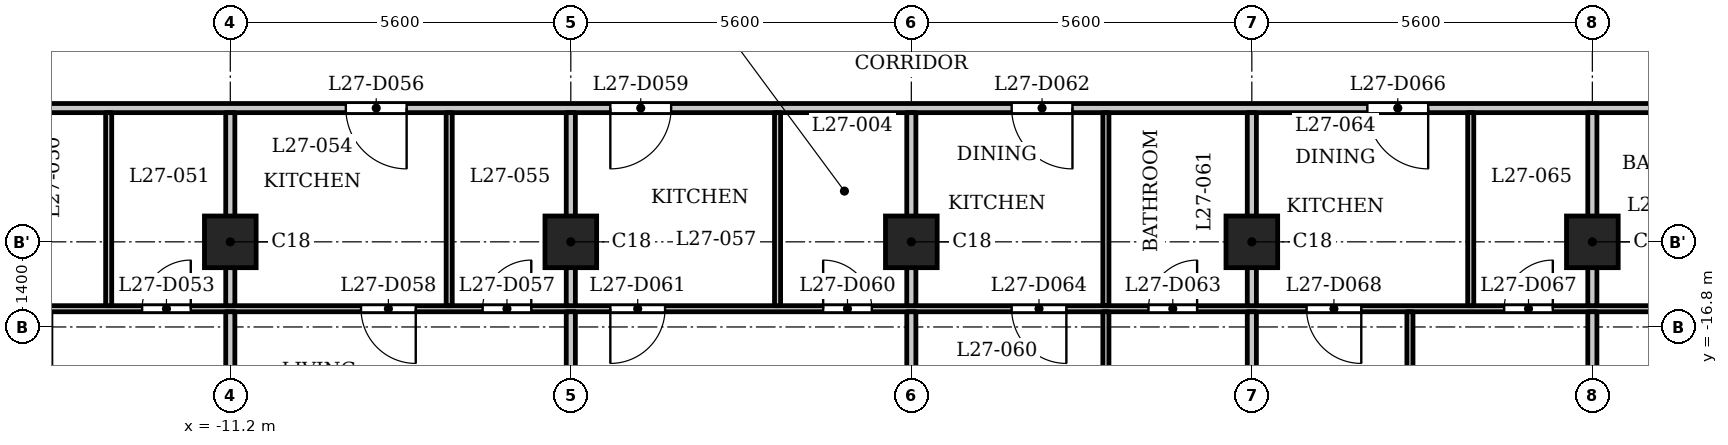
"""IFC4 building model, lengths in metres.
Left out: names, types, materials, properties, quantities, classifications, styles, units other than length and angle.
Written with IfcOpenShell. Run it as: python <this file> out.ifc"""

import sys

from ifc_helpers import new_model, si_unit, direction, frame, frame_2d, origin, origin_2d, place, context, subcontext, project, spatial, rectangle, extrude, element, fill, save


model = new_model("IFC4")
c1 = context("Model", 3, precision=1e-05, world=origin(), true_north=direction((0.0, 1.0)))
c2 = subcontext(c1, "Body", "Model", "MODEL_VIEW")
j1 = project(units=[si_unit("LENGTHUNIT", "METRE"), si_unit("PLANEANGLEUNIT", "RADIAN")], contexts=[c1])
p1 = place(None, origin())
s1 = spatial("IfcSite", under=j1, at=p1, CompositionType="ELEMENT")
p2 = place(p1, origin())
s2 = spatial("IfcBuilding", under=s1, at=p2, CompositionType="ELEMENT")
p3 = place(p2, frame((0.0, 0.0, 107.8)))
s3 = spatial("IfcBuildingStorey", under=s2, at=p3, CompositionType="ELEMENT", Elevation=107.8)
for number, where, z_axis, x_axis in (
    (1, (-11.2, -15.4, 0.0), (0.0, 0.0, 1.0), (1.0, 0.0, 0.0)),
    (2, (-5.6, -15.4, 0.0), (0.0, 0.0, 1.0), (1.0, 0.0, 0.0)),
    (3, (0.0, -15.4, 0.0), (0.0, 0.0, 1.0), (1.0, 0.0, 0.0)),
    (4, (5.6, -15.4, 0.0), (0.0, 0.0, 1.0), (1.0, 0.0, 0.0)),
    (5, (11.2, -15.4, 0.0), (0.0, 0.0, 1.0), (1.0, 0.0, 0.0)),
):
    element("IfcColumn", number, at=place(p3, frame(where, z_axis=z_axis, x_axis=x_axis)), inside=s3, PredefinedType="COLUMN", context=c2, shape_type="SweptSolid", body=[
        extrude(rectangle(XDim=0.85, YDim=0.85, at=origin_2d()), origin(), (0.0, 0.0, 1.0), 3.5),
    ])
p4 = place(p3, frame((-16.725, -16.5, 0.0), z_axis=(0.0, 0.0, 1.0), x_axis=(1.0, 0.0, 0.0)))
e6 = element("IfcWall", 6, at=p4, inside=s3, PredefinedType="PARTITIONING", context=c2, shape_type="SweptSolid", body=[
    extrude(rectangle(XDim=33.45, YDim=0.1, at=frame_2d((16.725, 0.0))), origin(), (0.0, 0.0, 1.0), 3.2),
])
p5 = place(p4, frame((4.075, 0.0, 0.0)))
e7 = element("IfcOpeningElement", 7, at=p5, cuts=e6, PredefinedType="OPENING", context=c2, shape_type="SweptSolid", body=[
    extrude(rectangle(XDim=0.8, YDim=2.1, at=frame_2d((0.4, 1.05))), frame((0.0, 0.06, 0.0), z_axis=(0.0, -1.0, 0.0), x_axis=(1.0, 0.0, 0.0)), (0.0, 0.0, 1.0), 0.12),
])
p6 = place(p4, frame((1.075, 0.0, 0.0)))
e8 = element("IfcOpeningElement", 8, at=p6, cuts=e6, PredefinedType="OPENING", context=c2, shape_type="SweptSolid", body=[
    extrude(rectangle(XDim=0.9, YDim=2.1, at=frame_2d((0.45, 1.05))), frame((0.0, 0.06, 0.0), z_axis=(0.0, -1.0, 0.0), x_axis=(1.0, 0.0, 0.0)), (0.0, 0.0, 1.0), 0.12),
])
p7 = place(p4, frame((9.675, 0.0, 0.0)))
e9 = element("IfcOpeningElement", 9, at=p7, cuts=e6, PredefinedType="OPENING", context=c2, shape_type="SweptSolid", body=[
    extrude(rectangle(XDim=0.8, YDim=2.1, at=frame_2d((0.4, 1.05))), frame((0.0, 0.06, 0.0), z_axis=(0.0, -1.0, 0.0), x_axis=(1.0, 0.0, 0.0)), (0.0, 0.0, 1.0), 0.12),
])
p8 = place(p4, frame((7.675, 0.0, 0.0)))
e10 = element("IfcOpeningElement", 10, at=p8, cuts=e6, PredefinedType="OPENING", context=c2, shape_type="SweptSolid", body=[
    extrude(rectangle(XDim=0.9, YDim=2.1, at=frame_2d((0.45, 1.05))), frame((0.0, 0.06, 0.0), z_axis=(0.0, -1.0, 0.0), x_axis=(1.0, 0.0, 0.0)), (0.0, 0.0, 1.0), 0.12),
])
p9 = place(p4, frame((15.275, 0.0, 0.0)))
e11 = element("IfcOpeningElement", 11, at=p9, cuts=e6, PredefinedType="OPENING", context=c2, shape_type="SweptSolid", body=[
    extrude(rectangle(XDim=0.8, YDim=2.1, at=frame_2d((0.4, 1.05))), frame((0.0, 0.06, 0.0), z_axis=(0.0, -1.0, 0.0), x_axis=(1.0, 0.0, 0.0)), (0.0, 0.0, 1.0), 0.12),
])
p10 = place(p4, frame((11.775, 0.0, 0.0)))
e12 = element("IfcOpeningElement", 12, at=p10, cuts=e6, PredefinedType="OPENING", context=c2, shape_type="SweptSolid", body=[
    extrude(rectangle(XDim=0.9, YDim=2.1, at=frame_2d((0.45, 1.05))), frame((0.0, 0.06, 0.0), z_axis=(0.0, -1.0, 0.0), x_axis=(1.0, 0.0, 0.0)), (0.0, 0.0, 1.0), 0.12),
])
p11 = place(p4, frame((20.625, 0.0, 0.0)))
e13 = element("IfcOpeningElement", 13, at=p11, cuts=e6, PredefinedType="OPENING", context=c2, shape_type="SweptSolid", body=[
    extrude(rectangle(XDim=0.8, YDim=2.1, at=frame_2d((0.4, 1.05))), frame((0.0, 0.06, 0.0), z_axis=(0.0, -1.0, 0.0), x_axis=(1.0, 0.0, 0.0)), (0.0, 0.0, 1.0), 0.12),
])
p12 = place(p4, frame((18.375, 0.0, 0.0)))
e14 = element("IfcOpeningElement", 14, at=p12, cuts=e6, PredefinedType="OPENING", context=c2, shape_type="SweptSolid", body=[
    extrude(rectangle(XDim=0.9, YDim=2.1, at=frame_2d((0.45, 1.05))), frame((0.0, 0.06, 0.0), z_axis=(0.0, -1.0, 0.0), x_axis=(1.0, 0.0, 0.0)), (0.0, 0.0, 1.0), 0.12),
])
p13 = place(p4, frame((26.475, 0.0, 0.0)))
e15 = element("IfcOpeningElement", 15, at=p13, cuts=e6, PredefinedType="OPENING", context=c2, shape_type="SweptSolid", body=[
    extrude(rectangle(XDim=0.8, YDim=2.1, at=frame_2d((0.4, 1.05))), frame((0.0, 0.06, 0.0), z_axis=(0.0, -1.0, 0.0), x_axis=(1.0, 0.0, 0.0)), (0.0, 0.0, 1.0), 0.12),
])
p14 = place(p4, frame((23.225, 0.0, 0.0)))
e16 = element("IfcOpeningElement", 16, at=p14, cuts=e6, PredefinedType="OPENING", context=c2, shape_type="SweptSolid", body=[
    extrude(rectangle(XDim=0.9, YDim=2.1, at=frame_2d((0.45, 1.05))), frame((0.0, 0.06, 0.0), z_axis=(0.0, -1.0, 0.0), x_axis=(1.0, 0.0, 0.0)), (0.0, 0.0, 1.0), 0.12),
])
p15 = place(p4, frame((29.475, 0.0, 0.0)))
e17 = element("IfcOpeningElement", 17, at=p15, cuts=e6, PredefinedType="OPENING", context=c2, shape_type="SweptSolid", body=[
    extrude(rectangle(XDim=0.8, YDim=2.1, at=frame_2d((0.4, 1.05))), frame((0.0, 0.06, 0.0), z_axis=(0.0, -1.0, 0.0), x_axis=(1.0, 0.0, 0.0)), (0.0, 0.0, 1.0), 0.12),
])
p16 = place(p4, frame((31.825, 0.0, 0.0)))
e18 = element("IfcOpeningElement", 18, at=p16, cuts=e6, PredefinedType="OPENING", context=c2, shape_type="SweptSolid", body=[
    extrude(rectangle(XDim=0.9, YDim=2.1, at=frame_2d((0.45, 1.05))), frame((0.0, 0.06, 0.0), z_axis=(0.0, -1.0, 0.0), x_axis=(1.0, 0.0, 0.0)), (0.0, 0.0, 1.0), 0.12),
])
p17 = place(p3, frame((-17.4, -13.2, 0.0), z_axis=(0.0, 0.0, 1.0), x_axis=(1.0, 0.0, 0.0)))
e19 = element("IfcWall", 19, at=p17, inside=s3, PredefinedType="PARTITIONING", context=c2, shape_type="SweptSolid", body=[
    extrude(rectangle(XDim=34.8, YDim=0.15, at=frame_2d((17.4, 0.0))), origin(), (0.0, 0.0, 1.0), 3.2),
])
p18 = place(p17, frame((0.15, 0.0, 0.0)))
e20 = element("IfcOpeningElement", 20, at=p18, cuts=e19, PredefinedType="OPENING", context=c2, shape_type="SweptSolid", body=[
    extrude(rectangle(XDim=1.0, YDim=2.1, at=frame_2d((0.5, 1.05))), frame((0.0, 0.085, 0.0), z_axis=(0.0, -1.0, 0.0), x_axis=(1.0, 0.0, 0.0)), (0.0, 0.0, 1.0), 0.17),
])
p19 = place(p17, frame((33.55, 0.0, 0.0)))
e21 = element("IfcOpeningElement", 21, at=p19, cuts=e19, PredefinedType="OPENING", context=c2, shape_type="SweptSolid", body=[
    extrude(rectangle(XDim=1.0, YDim=2.1, at=frame_2d((0.5, 1.05))), frame((0.0, 0.085, 0.0), z_axis=(0.0, -1.0, 0.0), x_axis=(1.0, 0.0, 0.0)), (0.0, 0.0, 1.0), 0.17),
])
p20 = place(p17, frame((8.1, 0.0, 0.0)))
e22 = element("IfcOpeningElement", 22, at=p20, cuts=e19, PredefinedType="OPENING", context=c2, shape_type="SweptSolid", body=[
    extrude(rectangle(XDim=1.0, YDim=2.1, at=frame_2d((0.5, 1.05))), frame((0.0, 0.085, 0.0), z_axis=(0.0, -1.0, 0.0), x_axis=(1.0, 0.0, 0.0)), (0.0, 0.0, 1.0), 0.17),
])
p21 = place(p17, frame((12.45, 0.0, 0.0)))
e23 = element("IfcOpeningElement", 23, at=p21, cuts=e19, PredefinedType="OPENING", context=c2, shape_type="SweptSolid", body=[
    extrude(rectangle(XDim=1.0, YDim=2.1, at=frame_2d((0.5, 1.05))), frame((0.0, 0.085, 0.0), z_axis=(0.0, -1.0, 0.0), x_axis=(1.0, 0.0, 0.0)), (0.0, 0.0, 1.0), 0.17),
])
p22 = place(p17, frame((19.05, 0.0, 0.0)))
e24 = element("IfcOpeningElement", 24, at=p22, cuts=e19, PredefinedType="OPENING", context=c2, shape_type="SweptSolid", body=[
    extrude(rectangle(XDim=1.0, YDim=2.1, at=frame_2d((0.5, 1.05))), frame((0.0, 0.085, 0.0), z_axis=(0.0, -1.0, 0.0), x_axis=(1.0, 0.0, 0.0)), (0.0, 0.0, 1.0), 0.17),
])
p23 = place(p17, frame((24.9, 0.0, 0.0)))
e25 = element("IfcOpeningElement", 25, at=p23, cuts=e19, PredefinedType="OPENING", context=c2, shape_type="SweptSolid", body=[
    extrude(rectangle(XDim=1.0, YDim=2.1, at=frame_2d((0.5, 1.05))), frame((0.0, 0.085, 0.0), z_axis=(0.0, -1.0, 0.0), x_axis=(1.0, 0.0, 0.0)), (0.0, 0.0, 1.0), 0.17),
])
p24 = place(p3, frame((-13.2, -16.45, 0.0), z_axis=(0.0, 0.0, 1.0), x_axis=(0.0, 1.0, 0.0)))
e26 = element("IfcWall", 26, at=p24, inside=s3, PredefinedType="PARTITIONING", context=c2, shape_type="SweptSolid", body=[
    extrude(rectangle(XDim=3.175, YDim=0.1, at=frame_2d((1.587, 0.0))), origin(), (0.0, 0.0, 1.0), 3.2),
])
p25 = place(p3, frame((-11.2, -22.98, 0.0), z_axis=(0.0, 0.0, 1.0), x_axis=(0.0, 1.0, 0.0)))
e27 = element("IfcWall", 27, at=p25, inside=s3, PredefinedType="PARTITIONING", context=c2, shape_type="SweptSolid", body=[
    extrude(rectangle(XDim=6.43, YDim=0.15, at=frame_2d((3.215, 0.0))), origin(), (0.0, 0.0, 1.0), 3.2),
])
p26 = place(p3, frame((-11.2, -16.45, 0.0), z_axis=(0.0, 0.0, 1.0), x_axis=(0.0, 1.0, 0.0)))
e28 = element("IfcWall", 28, at=p26, inside=s3, PredefinedType="PARTITIONING", context=c2, shape_type="SweptSolid", body=[
    extrude(rectangle(XDim=3.175, YDim=0.15, at=frame_2d((1.587, 0.0))), origin(), (0.0, 0.0, 1.0), 3.2),
])
p27 = place(p3, frame((-7.6, -16.45, 0.0), z_axis=(0.0, 0.0, 1.0), x_axis=(0.0, 1.0, 0.0)))
e29 = element("IfcWall", 29, at=p27, inside=s3, PredefinedType="PARTITIONING", context=c2, shape_type="SweptSolid", body=[
    extrude(rectangle(XDim=3.175, YDim=0.1, at=frame_2d((1.587, 0.0))), origin(), (0.0, 0.0, 1.0), 3.2),
])
p28 = place(p3, frame((-5.6, -22.98, 0.0), z_axis=(0.0, 0.0, 1.0), x_axis=(0.0, 1.0, 0.0)))
e30 = element("IfcWall", 30, at=p28, inside=s3, PredefinedType="PARTITIONING", context=c2, shape_type="SweptSolid", body=[
    extrude(rectangle(XDim=6.43, YDim=0.15, at=frame_2d((3.215, 0.0))), origin(), (0.0, 0.0, 1.0), 3.2),
])
p29 = place(p3, frame((-5.6, -16.45, 0.0), z_axis=(0.0, 0.0, 1.0), x_axis=(0.0, 1.0, 0.0)))
e31 = element("IfcWall", 31, at=p29, inside=s3, PredefinedType="PARTITIONING", context=c2, shape_type="SweptSolid", body=[
    extrude(rectangle(XDim=3.175, YDim=0.15, at=frame_2d((1.587, 0.0))), origin(), (0.0, 0.0, 1.0), 3.2),
])
p30 = place(p3, frame((-2.2, -16.45, 0.0), z_axis=(0.0, 0.0, 1.0), x_axis=(0.0, 1.0, 0.0)))
e32 = element("IfcWall", 32, at=p30, inside=s3, PredefinedType="PARTITIONING", context=c2, shape_type="SweptSolid", body=[
    extrude(rectangle(XDim=3.175, YDim=0.1, at=frame_2d((1.587, 0.0))), origin(), (0.0, 0.0, 1.0), 3.2),
])
p31 = place(p3, frame((0.0, -22.98, 0.0), z_axis=(0.0, 0.0, 1.0), x_axis=(0.0, 1.0, 0.0)))
e33 = element("IfcWall", 33, at=p31, inside=s3, PredefinedType="PARTITIONING", context=c2, shape_type="SweptSolid", body=[
    extrude(rectangle(XDim=6.43, YDim=0.15, at=frame_2d((3.215, 0.0))), origin(), (0.0, 0.0, 1.0), 3.2),
])
p32 = place(p3, frame((0.0, -16.45, 0.0), z_axis=(0.0, 0.0, 1.0), x_axis=(0.0, 1.0, 0.0)))
e34 = element("IfcWall", 34, at=p32, inside=s3, PredefinedType="PARTITIONING", context=c2, shape_type="SweptSolid", body=[
    extrude(rectangle(XDim=3.175, YDim=0.15, at=frame_2d((1.587, 0.0))), origin(), (0.0, 0.0, 1.0), 3.2),
])
p33 = place(p3, frame((3.2, -22.08, 0.0), z_axis=(0.0, 0.0, 1.0), x_axis=(0.0, 1.0, 0.0)))
e35 = element("IfcWall", 35, at=p33, inside=s3, PredefinedType="PARTITIONING", context=c2, shape_type="SweptSolid", body=[
    extrude(rectangle(XDim=5.53, YDim=0.1, at=frame_2d((2.765, 0.0))), origin(), (0.0, 0.0, 1.0), 3.2),
])
p34 = place(p33, frame((0.42, 0.0, 0.0)))
e36 = element("IfcOpeningElement", 36, at=p34, cuts=e35, PredefinedType="OPENING", context=c2, shape_type="SweptSolid", body=[
    extrude(rectangle(XDim=0.9, YDim=2.1, at=frame_2d((0.45, 1.05))), frame((0.0, 0.06, 0.0), z_axis=(0.0, -1.0, 0.0), x_axis=(1.0, 0.0, 0.0)), (0.0, 0.0, 1.0), 0.12),
])
p35 = place(p3, frame((3.2, -16.45, 0.0), z_axis=(0.0, 0.0, 1.0), x_axis=(0.0, 1.0, 0.0)))
e37 = element("IfcWall", 37, at=p35, inside=s3, PredefinedType="PARTITIONING", context=c2, shape_type="SweptSolid", body=[
    extrude(rectangle(XDim=3.175, YDim=0.1, at=frame_2d((1.587, 0.0))), origin(), (0.0, 0.0, 1.0), 3.2),
])
p36 = place(p3, frame((5.6, -22.98, 0.0), z_axis=(0.0, 0.0, 1.0), x_axis=(0.0, 1.0, 0.0)))
e38 = element("IfcWall", 38, at=p36, inside=s3, PredefinedType="PARTITIONING", context=c2, shape_type="SweptSolid", body=[
    extrude(rectangle(XDim=6.43, YDim=0.15, at=frame_2d((3.215, 0.0))), origin(), (0.0, 0.0, 1.0), 3.2),
])
p37 = place(p3, frame((5.6, -16.45, 0.0), z_axis=(0.0, 0.0, 1.0), x_axis=(0.0, 1.0, 0.0)))
e39 = element("IfcWall", 39, at=p37, inside=s3, PredefinedType="PARTITIONING", context=c2, shape_type="SweptSolid", body=[
    extrude(rectangle(XDim=3.175, YDim=0.15, at=frame_2d((1.587, 0.0))), origin(), (0.0, 0.0, 1.0), 3.2),
])
p38 = place(p3, frame((8.2, -22.08, 0.0), z_axis=(0.0, 0.0, 1.0), x_axis=(0.0, 1.0, 0.0)))
e40 = element("IfcWall", 40, at=p38, inside=s3, PredefinedType="PARTITIONING", context=c2, shape_type="SweptSolid", body=[
    extrude(rectangle(XDim=5.53, YDim=0.1, at=frame_2d((2.765, 0.0))), origin(), (0.0, 0.0, 1.0), 3.2),
])
p39 = place(p38, frame((0.42, 0.0, 0.0)))
e41 = element("IfcOpeningElement", 41, at=p39, cuts=e40, PredefinedType="OPENING", context=c2, shape_type="SweptSolid", body=[
    extrude(rectangle(XDim=0.9, YDim=2.1, at=frame_2d((0.45, 1.05))), frame((0.0, 0.06, 0.0), z_axis=(0.0, -1.0, 0.0), x_axis=(1.0, 0.0, 0.0)), (0.0, 0.0, 1.0), 0.12),
])
p40 = place(p3, frame((9.2, -16.45, 0.0), z_axis=(0.0, 0.0, 1.0), x_axis=(0.0, 1.0, 0.0)))
e42 = element("IfcWall", 42, at=p40, inside=s3, PredefinedType="PARTITIONING", context=c2, shape_type="SweptSolid", body=[
    extrude(rectangle(XDim=3.175, YDim=0.1, at=frame_2d((1.587, 0.0))), origin(), (0.0, 0.0, 1.0), 3.2),
])
p41 = place(p3, frame((11.2, -22.98, 0.0), z_axis=(0.0, 0.0, 1.0), x_axis=(0.0, 1.0, 0.0)))
e43 = element("IfcWall", 43, at=p41, inside=s3, PredefinedType="PARTITIONING", context=c2, shape_type="SweptSolid", body=[
    extrude(rectangle(XDim=6.43, YDim=0.15, at=frame_2d((3.215, 0.0))), origin(), (0.0, 0.0, 1.0), 3.2),
])
p42 = place(p3, frame((11.2, -16.45, 0.0), z_axis=(0.0, 0.0, 1.0), x_axis=(0.0, 1.0, 0.0)))
e44 = element("IfcWall", 44, at=p42, inside=s3, PredefinedType="PARTITIONING", context=c2, shape_type="SweptSolid", body=[
    extrude(rectangle(XDim=3.175, YDim=0.15, at=frame_2d((1.587, 0.0))), origin(), (0.0, 0.0, 1.0), 3.2),
])
p43 = place(p5, origin())
e45 = element("IfcDoor", 45, at=p43, inside=s3, OperationType="SINGLE_SWING_LEFT", PredefinedType="DOOR", context=c2, shape_type="SweptSolid", body=[
    extrude(rectangle(XDim=0.8, YDim=2.1, at=frame_2d((0.4, 1.05))), frame((0.0, 0.025, 0.0), z_axis=(0.0, -1.0, 0.0), x_axis=(1.0, 0.0, 0.0)), (0.0, 0.0, 1.0), 0.05),
])
fill(e7, e45)
p44 = place(p20, origin())
e46 = element("IfcDoor", 46, at=p44, inside=s3, OperationType="SINGLE_SWING_RIGHT", PredefinedType="DOOR", context=c2, shape_type="SweptSolid", body=[
    extrude(rectangle(XDim=1.0, YDim=2.1, at=frame_2d((0.5, 1.05))), frame((0.0, 0.025, 0.0), z_axis=(0.0, -1.0, 0.0), x_axis=(1.0, 0.0, 0.0)), (0.0, 0.0, 1.0), 0.05),
])
fill(e22, e46)
p45 = place(p7, origin())
e47 = element("IfcDoor", 47, at=p45, inside=s3, OperationType="SINGLE_SWING_LEFT", PredefinedType="DOOR", context=c2, shape_type="SweptSolid", body=[
    extrude(rectangle(XDim=0.8, YDim=2.1, at=frame_2d((0.4, 1.05))), frame((0.0, 0.025, 0.0), z_axis=(0.0, -1.0, 0.0), x_axis=(1.0, 0.0, 0.0)), (0.0, 0.0, 1.0), 0.05),
])
fill(e9, e47)
p46 = place(p8, origin())
e48 = element("IfcDoor", 48, at=p46, inside=s3, OperationType="SINGLE_SWING_RIGHT", PredefinedType="DOOR", context=c2, shape_type="SweptSolid", body=[
    extrude(rectangle(XDim=0.9, YDim=2.1, at=frame_2d((0.45, 1.05))), frame((0.0, 0.025, 0.0), z_axis=(0.0, -1.0, 0.0), x_axis=(1.0, 0.0, 0.0)), (0.0, 0.0, 1.0), 0.05),
])
fill(e10, e48)
p47 = place(p21, origin())
e49 = element("IfcDoor", 49, at=p47, inside=s3, OperationType="SINGLE_SWING_LEFT", PredefinedType="DOOR", context=c2, shape_type="SweptSolid", body=[
    extrude(rectangle(XDim=1.0, YDim=2.1, at=frame_2d((0.5, 1.05))), frame((0.0, 0.025, 0.0), z_axis=(0.0, -1.0, 0.0), x_axis=(1.0, 0.0, 0.0)), (0.0, 0.0, 1.0), 0.05),
])
fill(e23, e49)
p48 = place(p9, origin())
e50 = element("IfcDoor", 50, at=p48, inside=s3, OperationType="SINGLE_SWING_RIGHT", PredefinedType="DOOR", context=c2, shape_type="SweptSolid", body=[
    extrude(rectangle(XDim=0.8, YDim=2.1, at=frame_2d((0.4, 1.05))), frame((0.0, 0.025, 0.0), z_axis=(0.0, -1.0, 0.0), x_axis=(1.0, 0.0, 0.0)), (0.0, 0.0, 1.0), 0.05),
])
fill(e11, e50)
p49 = place(p10, origin())
e51 = element("IfcDoor", 51, at=p49, inside=s3, OperationType="SINGLE_SWING_LEFT", PredefinedType="DOOR", context=c2, shape_type="SweptSolid", body=[
    extrude(rectangle(XDim=0.9, YDim=2.1, at=frame_2d((0.45, 1.05))), frame((0.0, 0.025, 0.0), z_axis=(0.0, -1.0, 0.0), x_axis=(1.0, 0.0, 0.0)), (0.0, 0.0, 1.0), 0.05),
])
fill(e12, e51)
p50 = place(p22, origin())
e52 = element("IfcDoor", 52, at=p50, inside=s3, OperationType="SINGLE_SWING_RIGHT", PredefinedType="DOOR", context=c2, shape_type="SweptSolid", body=[
    extrude(rectangle(XDim=1.0, YDim=2.1, at=frame_2d((0.5, 1.05))), frame((0.0, 0.025, 0.0), z_axis=(0.0, -1.0, 0.0), x_axis=(1.0, 0.0, 0.0)), (0.0, 0.0, 1.0), 0.05),
])
fill(e24, e52)
p51 = place(p11, origin())
e53 = element("IfcDoor", 53, at=p51, inside=s3, OperationType="SINGLE_SWING_LEFT", PredefinedType="DOOR", context=c2, shape_type="SweptSolid", body=[
    extrude(rectangle(XDim=0.8, YDim=2.1, at=frame_2d((0.4, 1.05))), frame((0.0, 0.025, 0.0), z_axis=(0.0, -1.0, 0.0), x_axis=(1.0, 0.0, 0.0)), (0.0, 0.0, 1.0), 0.05),
])
fill(e13, e53)
p52 = place(p12, origin())
e54 = element("IfcDoor", 54, at=p52, inside=s3, OperationType="SINGLE_SWING_RIGHT", PredefinedType="DOOR", context=c2, shape_type="SweptSolid", body=[
    extrude(rectangle(XDim=0.9, YDim=2.1, at=frame_2d((0.45, 1.05))), frame((0.0, 0.025, 0.0), z_axis=(0.0, -1.0, 0.0), x_axis=(1.0, 0.0, 0.0)), (0.0, 0.0, 1.0), 0.05),
])
fill(e14, e54)
p53 = place(p23, origin())
e55 = element("IfcDoor", 55, at=p53, inside=s3, OperationType="SINGLE_SWING_RIGHT", PredefinedType="DOOR", context=c2, shape_type="SweptSolid", body=[
    extrude(rectangle(XDim=1.0, YDim=2.1, at=frame_2d((0.5, 1.05))), frame((0.0, 0.025, 0.0), z_axis=(0.0, -1.0, 0.0), x_axis=(1.0, 0.0, 0.0)), (0.0, 0.0, 1.0), 0.05),
])
fill(e25, e55)
p54 = place(p13, origin())
e56 = element("IfcDoor", 56, at=p54, inside=s3, OperationType="SINGLE_SWING_LEFT", PredefinedType="DOOR", context=c2, shape_type="SweptSolid", body=[
    extrude(rectangle(XDim=0.8, YDim=2.1, at=frame_2d((0.4, 1.05))), frame((0.0, 0.025, 0.0), z_axis=(0.0, -1.0, 0.0), x_axis=(1.0, 0.0, 0.0)), (0.0, 0.0, 1.0), 0.05),
])
fill(e15, e56)
p55 = place(p14, origin())
e57 = element("IfcDoor", 57, at=p55, inside=s3, OperationType="SINGLE_SWING_RIGHT", PredefinedType="DOOR", context=c2, shape_type="SweptSolid", body=[
    extrude(rectangle(XDim=0.9, YDim=2.1, at=frame_2d((0.45, 1.05))), frame((0.0, 0.025, 0.0), z_axis=(0.0, -1.0, 0.0), x_axis=(1.0, 0.0, 0.0)), (0.0, 0.0, 1.0), 0.05),
])
fill(e16, e57)
save(model, sys.argv[1])
